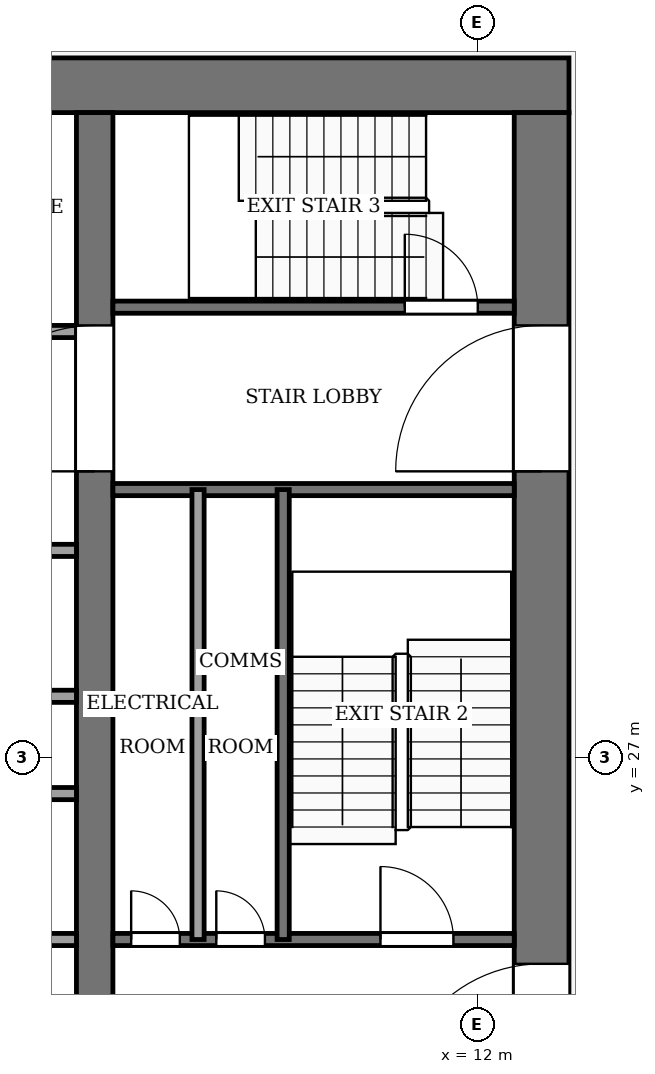
"""IFC4 building model, lengths in metres.
Left out: names, types, materials, properties, quantities, classifications, styles, units other than length and angle.
Written with IfcOpenShell. Run it as: python <this file> out.ifc"""

import sys

from ifc_helpers import new_model, si_unit, direction, frame, frame_2d, origin, place, context, subcontext, project, spatial, rectangle, extrude, element, fill, save


model = new_model("IFC4")
c1 = context("Model", 3, precision=1e-05, world=origin(), true_north=direction((0.0, 1.0)))
c2 = subcontext(c1, "Body", "Model", "MODEL_VIEW")
j1 = project(units=[si_unit("LENGTHUNIT", "METRE"), si_unit("PLANEANGLEUNIT", "RADIAN")], contexts=[c1])
p1 = place(None, origin())
s1 = spatial("IfcSite", under=j1, at=p1, CompositionType="ELEMENT")
p2 = place(p1, origin())
s2 = spatial("IfcBuilding", under=s1, at=p2, CompositionType="ELEMENT")
p3 = place(p2, frame((0.0, 0.0, 214.0)))
s3 = spatial("IfcBuildingStorey", under=s2, at=p3, CompositionType="ELEMENT", Elevation=214.0)
p4 = place(p3, frame((-13.5, 38.05, -0.13), z_axis=(0.0, 0.0, 1.0), x_axis=(1.0, 0.0, 0.0)))
e1 = element("IfcWall", 1, at=p4, inside=s3, PredefinedType="SHEAR", context=c2, shape_type="SweptSolid", body=[
    extrude(rectangle(XDim=27.0, YDim=0.9, at=frame_2d((13.5, 0.0))), origin(), (0.0, 0.0, 1.0), 4.0),
])
p5 = place(p3, frame((13.05, 18.4, -0.13), z_axis=(0.0, 0.0, 1.0), x_axis=(0.0, 1.0, 0.0)))
e2 = element("IfcWall", 2, at=p5, inside=s3, PredefinedType="SHEAR", context=c2, shape_type="SweptSolid", body=[
    extrude(rectangle(XDim=19.2, YDim=0.9, at=frame_2d((9.6, 0.0))), origin(), (0.0, 0.0, 1.0), 4.0),
])
p6 = place(p5, frame((2.8, 0.0, 0.13)))
e3 = element("IfcOpeningElement", 3, at=p6, cuts=e2, PredefinedType="OPENING", context=c2, shape_type="SweptSolid", body=[
    extrude(rectangle(XDim=2.4, YDim=2.4, at=frame_2d((1.2, 1.2))), frame((0.0, 0.46, 0.0), z_axis=(0.0, -1.0, 0.0), x_axis=(1.0, 0.0, 0.0)), (0.0, 0.0, 1.0), 0.92),
])
p7 = place(p5, frame((13.3, 0.0, 0.13)))
e4 = element("IfcOpeningElement", 4, at=p7, cuts=e2, PredefinedType="OPENING", context=c2, shape_type="SweptSolid", body=[
    extrude(rectangle(XDim=2.4, YDim=2.4, at=frame_2d((1.2, 1.2))), frame((0.0, 0.46, 0.0), z_axis=(0.0, -1.0, 0.0), x_axis=(1.0, 0.0, 0.0)), (0.0, 0.0, 1.0), 0.92),
])
p8 = place(p3, frame((5.7, 18.4, -0.13), z_axis=(0.0, 0.0, 1.0), x_axis=(0.0, 1.0, 0.0)))
e5 = element("IfcWall", 5, at=p8, inside=s3, PredefinedType="SHEAR", context=c2, shape_type="SweptSolid", body=[
    extrude(rectangle(XDim=19.2, YDim=0.6, at=frame_2d((9.6, 0.0))), origin(), (0.0, 0.0, 1.0), 4.0),
])
p9 = place(p8, frame((13.3, 0.0, 0.13)))
e6 = element("IfcOpeningElement", 6, at=p9, cuts=e5, PredefinedType="OPENING", context=c2, shape_type="SweptSolid", body=[
    extrude(rectangle(XDim=2.4, YDim=2.4, at=frame_2d((1.2, 1.2))), frame((0.0, 0.31, 0.0), z_axis=(0.0, -1.0, 0.0), x_axis=(1.0, 0.0, 0.0)), (0.0, 0.0, 1.0), 0.62),
])
p10 = place(p3, frame((-5.4, 24.0, 0.0), z_axis=(0.0, 0.0, 1.0), x_axis=(1.0, 0.0, 0.0)))
e7 = element("IfcWall", 7, at=p10, inside=s3, PredefinedType="PARTITIONING", context=c2, shape_type="SweptSolid", body=[
    extrude(rectangle(XDim=10.8, YDim=0.2, at=frame_2d((5.4, 0.0))), origin(), (0.0, 0.0, 1.0), 3.87),
])
p11 = place(p10, frame((0.75, 0.0, 0.0)))
e8 = element("IfcOpeningElement", 8, at=p11, cuts=e7, PredefinedType="OPENING", context=c2, shape_type="SweptSolid", body=[
    extrude(rectangle(XDim=1.2, YDim=2.2, at=frame_2d((0.6, 1.1))), frame((0.0, 0.11, 0.0), z_axis=(0.0, -1.0, 0.0), x_axis=(1.0, 0.0, 0.0)), (0.0, 0.0, 1.0), 0.22),
])
p12 = place(p10, frame((3.45, 0.0, 0.0)))
e9 = element("IfcOpeningElement", 9, at=p12, cuts=e7, PredefinedType="OPENING", context=c2, shape_type="SweptSolid", body=[
    extrude(rectangle(XDim=1.2, YDim=2.2, at=frame_2d((0.6, 1.1))), frame((0.0, 0.11, 0.0), z_axis=(0.0, -1.0, 0.0), x_axis=(1.0, 0.0, 0.0)), (0.0, 0.0, 1.0), 0.22),
])
p13 = place(p10, frame((6.15, 0.0, 0.0)))
e10 = element("IfcOpeningElement", 10, at=p13, cuts=e7, PredefinedType="OPENING", context=c2, shape_type="SweptSolid", body=[
    extrude(rectangle(XDim=1.2, YDim=2.2, at=frame_2d((0.6, 1.1))), frame((0.0, 0.11, 0.0), z_axis=(0.0, -1.0, 0.0), x_axis=(1.0, 0.0, 0.0)), (0.0, 0.0, 1.0), 0.22),
])
p14 = place(p10, frame((8.85, 0.0, 0.0)))
e11 = element("IfcOpeningElement", 11, at=p14, cuts=e7, PredefinedType="OPENING", context=c2, shape_type="SweptSolid", body=[
    extrude(rectangle(XDim=1.2, YDim=2.2, at=frame_2d((0.6, 1.1))), frame((0.0, 0.11, 0.0), z_axis=(0.0, -1.0, 0.0), x_axis=(1.0, 0.0, 0.0)), (0.0, 0.0, 1.0), 0.22),
])
p15 = place(p3, frame((6.0, 24.0, 0.0), z_axis=(0.0, 0.0, 1.0), x_axis=(1.0, 0.0, 0.0)))
e12 = element("IfcWall", 12, at=p15, inside=s3, PredefinedType="PARTITIONING", context=c2, shape_type="SweptSolid", body=[
    extrude(rectangle(XDim=6.6, YDim=0.2, at=frame_2d((3.3, 0.0))), origin(), (0.0, 0.0, 1.0), 3.87),
])
p16 = place(p15, frame((0.3, 0.0, 0.0)))
e13 = element("IfcOpeningElement", 13, at=p16, cuts=e12, PredefinedType="OPENING", context=c2, shape_type="SweptSolid", body=[
    extrude(rectangle(XDim=0.8, YDim=2.1, at=frame_2d((0.4, 1.05))), frame((0.0, 0.11, 0.0), z_axis=(0.0, -1.0, 0.0), x_axis=(1.0, 0.0, 0.0)), (0.0, 0.0, 1.0), 0.22),
])
p17 = place(p15, frame((1.7, 0.0, 0.0)))
e14 = element("IfcOpeningElement", 14, at=p17, cuts=e12, PredefinedType="OPENING", context=c2, shape_type="SweptSolid", body=[
    extrude(rectangle(XDim=0.8, YDim=2.1, at=frame_2d((0.4, 1.05))), frame((0.0, 0.11, 0.0), z_axis=(0.0, -1.0, 0.0), x_axis=(1.0, 0.0, 0.0)), (0.0, 0.0, 1.0), 0.22),
])
p18 = place(p15, frame((4.4, 0.0, 0.0)))
e15 = element("IfcOpeningElement", 15, at=p18, cuts=e12, PredefinedType="OPENING", context=c2, shape_type="SweptSolid", body=[
    extrude(rectangle(XDim=1.2, YDim=2.2, at=frame_2d((0.6, 1.1))), frame((0.0, 0.11, 0.0), z_axis=(0.0, -1.0, 0.0), x_axis=(1.0, 0.0, 0.0)), (0.0, 0.0, 1.0), 0.22),
])
for number, where, z_axis, x_axis in (
    (16, (-5.4, 26.4, 0.0), (0.0, 0.0, 1.0), (1.0, 0.0, 0.0)),
    (17, (-5.4, 28.0, 0.0), (0.0, 0.0, 1.0), (1.0, 0.0, 0.0)),
):
    element("IfcWall", number, at=place(p3, frame(where, z_axis=z_axis, x_axis=x_axis)), inside=s3, PredefinedType="PARTITIONING", context=c2, shape_type="SweptSolid", body=[
        extrude(rectangle(XDim=10.8, YDim=0.2, at=frame_2d((5.4, 0.0))), origin(), (0.0, 0.0, 1.0), 3.87),
    ])
p19 = place(p3, frame((-5.4, 30.4, 0.0), z_axis=(0.0, 0.0, 1.0), x_axis=(1.0, 0.0, 0.0)))
e18 = element("IfcWall", 18, at=p19, inside=s3, PredefinedType="PARTITIONING", context=c2, shape_type="SweptSolid", body=[
    extrude(rectangle(XDim=10.8, YDim=0.2, at=frame_2d((5.4, 0.0))), origin(), (0.0, 0.0, 1.0), 3.87),
])
p20 = place(p19, frame((2.848, 0.0, 0.0)))
e19 = element("IfcOpeningElement", 19, at=p20, cuts=e18, PredefinedType="OPENING", context=c2, shape_type="SweptSolid", body=[
    extrude(rectangle(XDim=1.0, YDim=2.1, at=frame_2d((0.5, 1.05))), frame((0.0, 0.11, 0.0), z_axis=(0.0, -1.0, 0.0), x_axis=(1.0, 0.0, 0.0)), (0.0, 0.0, 1.0), 0.22),
])
p21 = place(p19, frame((8.248, 0.0, 0.0)))
e20 = element("IfcOpeningElement", 20, at=p21, cuts=e18, PredefinedType="OPENING", context=c2, shape_type="SweptSolid", body=[
    extrude(rectangle(XDim=1.0, YDim=2.1, at=frame_2d((0.5, 1.05))), frame((0.0, 0.11, 0.0), z_axis=(0.0, -1.0, 0.0), x_axis=(1.0, 0.0, 0.0)), (0.0, 0.0, 1.0), 0.22),
])
p22 = place(p3, frame((6.0, 31.4, 0.0), z_axis=(0.0, 0.0, 1.0), x_axis=(1.0, 0.0, 0.0)))
e21 = element("IfcWall", 21, at=p22, inside=s3, PredefinedType="PARTITIONING", context=c2, shape_type="SweptSolid", body=[
    extrude(rectangle(XDim=6.6, YDim=0.2, at=frame_2d((3.3, 0.0))), origin(), (0.0, 0.0, 1.0), 3.87),
])
p23 = place(p3, frame((-5.4, 34.0, 0.0), z_axis=(0.0, 0.0, 1.0), x_axis=(1.0, 0.0, 0.0)))
e22 = element("IfcWall", 22, at=p23, inside=s3, PredefinedType="PARTITIONING", context=c2, shape_type="SweptSolid", body=[
    extrude(rectangle(XDim=10.8, YDim=0.2, at=frame_2d((5.4, 0.0))), origin(), (0.0, 0.0, 1.0), 3.87),
])
p24 = place(p23, frame((6.15, 0.0, 0.0)))
e23 = element("IfcOpeningElement", 23, at=p24, cuts=e22, PredefinedType="OPENING", context=c2, shape_type="SweptSolid", body=[
    extrude(rectangle(XDim=1.2, YDim=2.2, at=frame_2d((0.6, 1.1))), frame((0.0, 0.11, 0.0), z_axis=(0.0, -1.0, 0.0), x_axis=(1.0, 0.0, 0.0)), (0.0, 0.0, 1.0), 0.22),
])
p25 = place(p23, frame((8.95, 0.0, 0.0)))
e24 = element("IfcOpeningElement", 24, at=p25, cuts=e22, PredefinedType="OPENING", context=c2, shape_type="SweptSolid", body=[
    extrude(rectangle(XDim=1.0, YDim=2.1, at=frame_2d((0.5, 1.05))), frame((0.0, 0.11, 0.0), z_axis=(0.0, -1.0, 0.0), x_axis=(1.0, 0.0, 0.0)), (0.0, 0.0, 1.0), 0.22),
])
p26 = place(p3, frame((6.0, 34.4, 0.0), z_axis=(0.0, 0.0, 1.0), x_axis=(1.0, 0.0, 0.0)))
e25 = element("IfcWall", 25, at=p26, inside=s3, PredefinedType="PARTITIONING", context=c2, shape_type="SweptSolid", body=[
    extrude(rectangle(XDim=6.6, YDim=0.2, at=frame_2d((3.3, 0.0))), origin(), (0.0, 0.0, 1.0), 3.87),
])
p27 = place(p26, frame((4.8, 0.0, 0.0)))
e26 = element("IfcOpeningElement", 26, at=p27, cuts=e25, PredefinedType="OPENING", context=c2, shape_type="SweptSolid", body=[
    extrude(rectangle(XDim=1.2, YDim=2.2, at=frame_2d((0.6, 1.1))), frame((0.0, 0.11, 0.0), z_axis=(0.0, -1.0, 0.0), x_axis=(1.0, 0.0, 0.0)), (0.0, 0.0, 1.0), 0.22),
])
for number, where, z_axis, x_axis in (
    (27, (7.4, 24.0, 0.0), (0.0, 0.0, 1.0), (0.0, 1.0, 0.0)),
    (28, (8.8, 24.0, 0.0), (0.0, 0.0, 1.0), (0.0, 1.0, 0.0)),
):
    element("IfcWall", number, at=place(p3, frame(where, z_axis=z_axis, x_axis=x_axis)), inside=s3, PredefinedType="PARTITIONING", context=c2, shape_type="SweptSolid", body=[
        extrude(rectangle(XDim=7.4, YDim=0.2, at=frame_2d((3.7, 0.0))), origin(), (0.0, 0.0, 1.0), 3.87),
    ])
p28 = place(p16, origin())
e29 = element("IfcDoor", 29, at=p28, inside=s3, OperationType="SINGLE_SWING_RIGHT", PredefinedType="DOOR", context=c2, shape_type="SweptSolid", body=[
    extrude(rectangle(XDim=0.8, YDim=2.1, at=frame_2d((0.4, 1.05))), frame((0.0, 0.025, 0.0), z_axis=(0.0, -1.0, 0.0), x_axis=(1.0, 0.0, 0.0)), (0.0, 0.0, 1.0), 0.05),
])
fill(e13, e29)
p29 = place(p17, origin())
e30 = element("IfcDoor", 30, at=p29, inside=s3, OperationType="SINGLE_SWING_LEFT", PredefinedType="DOOR", context=c2, shape_type="SweptSolid", body=[
    extrude(rectangle(XDim=0.8, YDim=2.1, at=frame_2d((0.4, 1.05))), frame((0.0, 0.025, 0.0), z_axis=(0.0, -1.0, 0.0), x_axis=(1.0, 0.0, 0.0)), (0.0, 0.0, 1.0), 0.05),
])
fill(e14, e30)
p30 = place(p18, origin())
e31 = element("IfcDoor", 31, at=p30, inside=s3, OperationType="SINGLE_SWING_RIGHT", PredefinedType="DOOR", context=c2, shape_type="SweptSolid", body=[
    extrude(rectangle(XDim=1.2, YDim=2.2, at=frame_2d((0.6, 1.1))), frame((0.0, 0.025, 0.0), z_axis=(0.0, -1.0, 0.0), x_axis=(1.0, 0.0, 0.0)), (0.0, 0.0, 1.0), 0.05),
])
fill(e15, e31)
p31 = place(p27, origin())
e32 = element("IfcDoor", 32, at=p31, inside=s3, OperationType="SINGLE_SWING_LEFT", PredefinedType="DOOR", context=c2, shape_type="SweptSolid", body=[
    extrude(rectangle(XDim=1.2, YDim=2.2, at=frame_2d((0.6, 1.1))), frame((0.0, 0.025, 0.0), z_axis=(0.0, -1.0, 0.0), x_axis=(1.0, 0.0, 0.0)), (0.0, 0.0, 1.0), 0.05),
])
fill(e26, e32)
p32 = place(p9, origin())
e33 = element("IfcDoor", 33, at=p32, inside=s3, OperationType="DOUBLE_DOOR_SINGLE_SWING", PredefinedType="DOOR", context=c2, shape_type="SweptSolid", body=[
    extrude(rectangle(XDim=2.4, YDim=2.4, at=frame_2d((1.2, 1.2))), frame((0.0, 0.025, 0.0), z_axis=(0.0, -1.0, 0.0), x_axis=(1.0, 0.0, 0.0)), (0.0, 0.0, 1.0), 0.05),
])
fill(e6, e33)
p33 = place(p6, origin())
e34 = element("IfcDoor", 34, at=p33, inside=s3, OperationType="DOUBLE_DOOR_SINGLE_SWING", PredefinedType="DOOR", context=c2, shape_type="SweptSolid", body=[
    extrude(rectangle(XDim=2.4, YDim=2.4, at=frame_2d((1.2, 1.2))), frame((0.0, 0.025, 0.0), z_axis=(0.0, -1.0, 0.0), x_axis=(1.0, 0.0, 0.0)), (0.0, 0.0, 1.0), 0.05),
])
fill(e3, e34)
p34 = place(p7, origin())
e35 = element("IfcDoor", 35, at=p34, inside=s3, OperationType="DOUBLE_DOOR_SINGLE_SWING", PredefinedType="DOOR", context=c2, shape_type="SweptSolid", body=[
    extrude(rectangle(XDim=2.4, YDim=2.4, at=frame_2d((1.2, 1.2))), frame((0.0, 0.025, 0.0), z_axis=(0.0, -1.0, 0.0), x_axis=(1.0, 0.0, 0.0)), (0.0, 0.0, 1.0), 0.05),
])
fill(e4, e35)
save(model, sys.argv[1])
